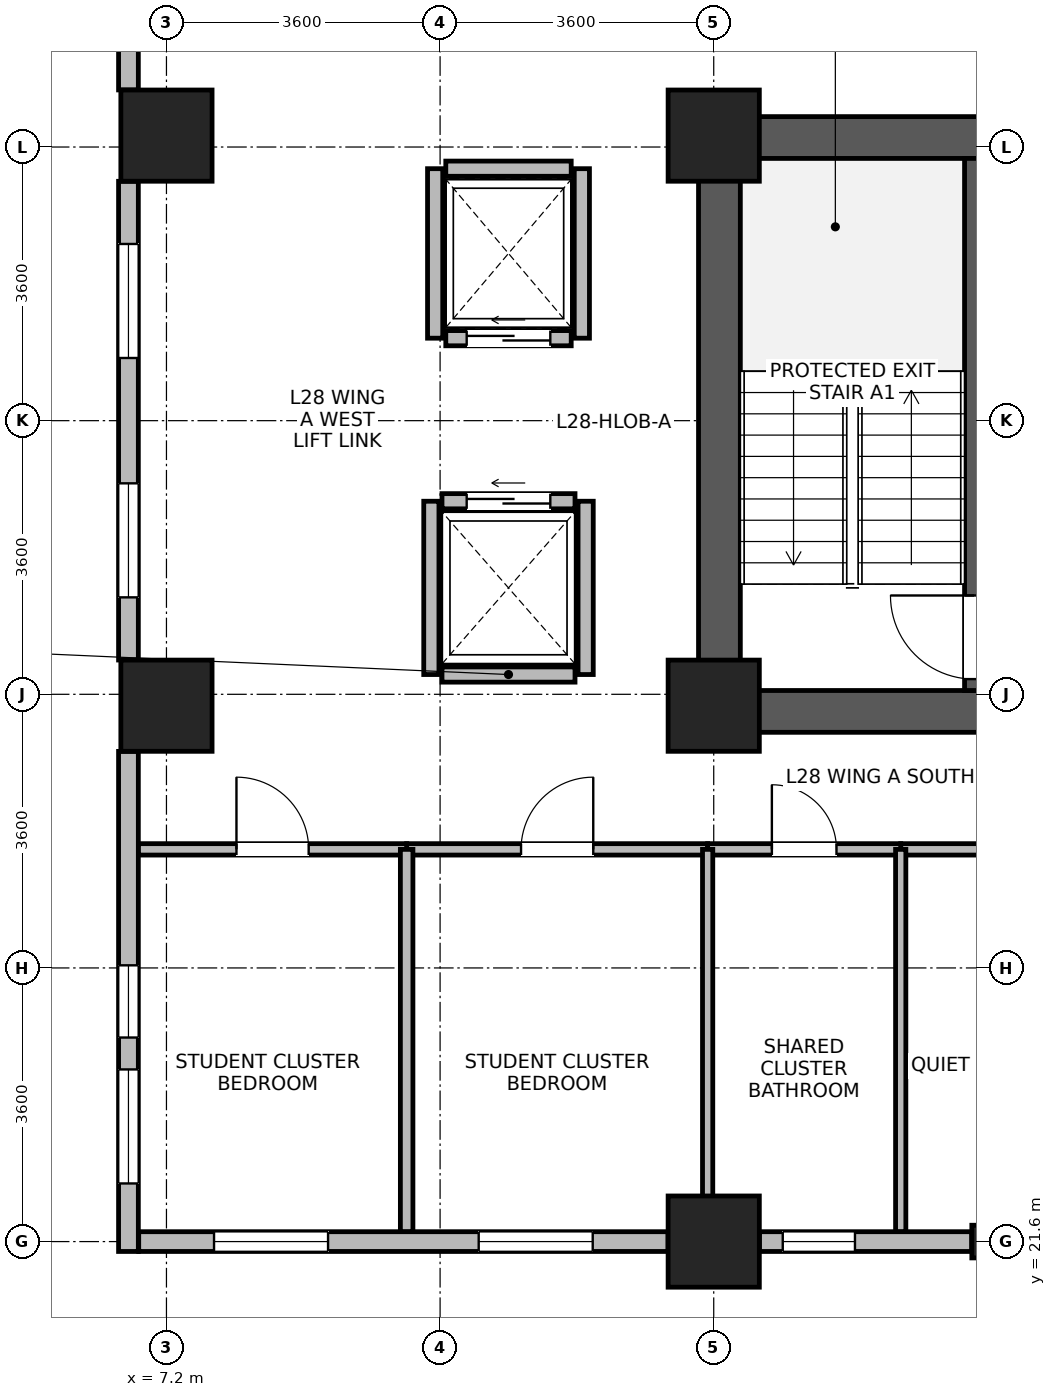
"""IFC4 building model, lengths in metres.
Left out: names, types, materials, properties, quantities, classifications, styles, units other than length and angle.
Written with IfcOpenShell. Run it as: python <this file> out.ifc"""

import sys

from ifc_helpers import new_model, si_unit, direction, frame, frame_2d, origin, origin_2d, place, context, subcontext, project, spatial, rectangle, i_section, extrude, source, transform, mapped, element, fill, save


model = new_model("IFC4")
c1 = context("Model", 3, precision=1e-05, world=origin(), true_north=direction((0.0, 1.0)))
c2 = subcontext(c1, "Body", "Model", "MODEL_VIEW")
j1 = project(units=[si_unit("LENGTHUNIT", "METRE"), si_unit("PLANEANGLEUNIT", "RADIAN")], contexts=[c1])
p1 = place(None, origin())
s1 = spatial("IfcSite", under=j1, at=p1, CompositionType="ELEMENT")
p2 = place(p1, origin())
s2 = spatial("IfcBuilding", under=s1, at=p2, CompositionType="ELEMENT")
p3 = place(p2, frame((0.0, 0.0, 111.9)))
s3 = spatial("IfcBuildingStorey", under=s2, at=p3, CompositionType="ELEMENT", Elevation=111.9)
p4 = place(p3, frame((14.475, 28.3, 0.0), z_axis=(0.0, 0.0, 1.0), x_axis=(0.0, 1.0, 0.0)))
e1 = element("IfcWall", 1, at=p4, inside=s3, PredefinedType="SHEAR", context=c2, shape_type="SweptSolid", body=[
    extrude(rectangle(XDim=8.1, YDim=0.55, at=frame_2d((4.05, 0.0))), origin(), (0.0, 0.0, 1.0), 3.45),
])
for number, where, z_axis, x_axis in (
    (2, (14.75, 28.575, 0.0), (0.0, 0.0, 1.0), (1.0, 0.0, 0.0)),
    (3, (14.75, 36.125, 0.0), (0.0, 0.0, 1.0), (1.0, 0.0, 0.0)),
):
    element("IfcWall", number, at=place(p3, frame(where, z_axis=z_axis, x_axis=x_axis)), inside=s3, PredefinedType="SHEAR", context=c2, shape_type="SweptSolid", body=[
        extrude(rectangle(XDim=3.2, YDim=0.55, at=frame_2d((1.6, 0.0))), origin(), (0.0, 0.0, 1.0), 3.45),
    ])
p5 = place(p3, frame((17.825, 28.85, 0.0), z_axis=(0.0, 0.0, 1.0), x_axis=(0.0, 1.0, 0.0)))
e4 = element("IfcWall", 4, at=p5, inside=s3, PredefinedType="SHEAR", context=c2, shape_type="SweptSolid", body=[
    extrude(rectangle(XDim=7.0, YDim=0.25, at=frame_2d((3.5, 0.0))), origin(), (0.0, 0.0, 1.0), 3.45),
])
p6 = place(p5, frame((0.15, 0.0, 0.0)))
e5 = element("IfcOpeningElement", 5, at=p6, cuts=e4, PredefinedType="OPENING", context=c2, shape_type="SweptSolid", body=[
    extrude(rectangle(XDim=1.1, YDim=2.08, at=frame_2d((0.55, 1.04))), frame((0.0, 0.135, 0.0), z_axis=(0.0, -1.0, 0.0), x_axis=(1.0, 0.0, 0.0)), (0.0, 0.0, 1.0), 0.27),
])
m1 = source(origin(), c2, "Body", "SweptSolid", [
    extrude(rectangle(XDim=1.2, YDim=1.2, at=origin_2d()), origin(), (0.0, 0.0, 1.0), 3.7),
])
for number, where, z_axis, x_axis in (
    (6, (7.2, 28.65, 0.0), (0.0, 0.0, 1.0), (1.0, 0.0, 0.0)),
    (7, (7.2, 36.15, 0.0), (0.0, 0.0, 1.0), (1.0, 0.0, 0.0)),
    (8, (14.4, 21.6, 0.0), (0.0, 0.0, 1.0), (1.0, 0.0, 0.0)),
    (9, (14.4, 28.65, 0.0), (0.0, 0.0, 1.0), (1.0, 0.0, 0.0)),
    (10, (14.4, 36.15, 0.0), (0.0, 0.0, 1.0), (1.0, 0.0, 0.0)),
):
    element("IfcColumn", number, at=place(p3, frame(where, z_axis=z_axis, x_axis=x_axis)), inside=s3, PredefinedType="COLUMN", context=c2, shape_type="MappedRepresentation", body=[
        mapped(m1, transform((0.0, 0.0, 0.0), x_axis=(1.0, 0.0, 0.0), y_axis=(0.0, 1.0, 0.0), z_axis=(0.0, 0.0, 1.0), scale=1.0)),
    ])
m2 = source(origin(), c2, "Body", "SweptSolid", [
    extrude(i_section(OverallWidth=0.409, OverallDepth=0.43, WebThickness=0.024, FlangeThickness=0.033, FilletRadius=0.015, at=origin_2d()), origin(), (0.0, 0.0, 1.0), 3.7),
])
p7 = place(p3, frame((18.0, 21.6, 0.0), z_axis=(0.0, 0.0, 1.0), x_axis=(1.0, 0.0, 0.0)))
e11 = element("IfcColumn", 11, at=p7, inside=s3, PredefinedType="COLUMN", context=c2, shape_type="MappedRepresentation", body=[
    mapped(m2, transform((0.0, 0.0, 0.0), x_axis=(1.0, 0.0, 0.0), y_axis=(0.0, 1.0, 0.0), z_axis=(0.0, 0.0, 1.0), scale=1.0)),
])
p8 = place(p3, frame((6.7, 36.751, 0.0), z_axis=(0.0, 0.0, 1.0), x_axis=(0.0, 1.0, 0.0)))
e12 = element("IfcWall", 12, at=p8, inside=s3, PredefinedType="STANDARD", context=c2, shape_type="SweptSolid", body=[
    extrude(rectangle(XDim=2.979, YDim=0.26, at=frame_2d((1.49, 0.0))), origin(), (0.0, 0.0, 1.0), 3.43),
])
p9 = place(p8, frame((1.014, 0.0, 0.85)))
e13 = element("IfcOpeningElement", 13, at=p9, cuts=e12, PredefinedType="OPENING", context=c2, shape_type="SweptSolid", body=[
    extrude(rectangle(XDim=0.95, YDim=1.75, at=frame_2d((0.475, 0.875))), frame((0.0, 0.14, 0.0), z_axis=(0.0, -1.0, 0.0), x_axis=(1.0, 0.0, 0.0)), (0.0, 0.0, 1.0), 0.28),
])
p10 = place(p3, frame((6.7, 29.251, 0.0), z_axis=(0.0, 0.0, 1.0), x_axis=(0.0, 1.0, 0.0)))
e14 = element("IfcWall", 14, at=p10, inside=s3, PredefinedType="STANDARD", context=c2, shape_type="SweptSolid", body=[
    extrude(rectangle(XDim=6.298, YDim=0.26, at=frame_2d((3.149, 0.0))), origin(), (0.0, 0.0, 1.0), 3.43),
])
p11 = place(p10, frame((0.824, 0.0, 0.85)))
e15 = element("IfcOpeningElement", 15, at=p11, cuts=e14, PredefinedType="OPENING", context=c2, shape_type="SweptSolid", body=[
    extrude(rectangle(XDim=1.5, YDim=1.85, at=frame_2d((0.75, 0.925))), frame((0.0, 0.14, 0.0), z_axis=(0.0, -1.0, 0.0), x_axis=(1.0, 0.0, 0.0)), (0.0, 0.0, 1.0), 0.28),
])
p12 = place(p10, frame((3.973, 0.0, 0.85)))
e16 = element("IfcOpeningElement", 16, at=p12, cuts=e14, PredefinedType="OPENING", context=c2, shape_type="SweptSolid", body=[
    extrude(rectangle(XDim=1.5, YDim=1.85, at=frame_2d((0.75, 0.925))), frame((0.0, 0.14, 0.0), z_axis=(0.0, -1.0, 0.0), x_axis=(1.0, 0.0, 0.0)), (0.0, 0.0, 1.0), 0.28),
])
p13 = place(p3, frame((6.7, 21.47, 0.0), z_axis=(0.0, 0.0, 1.0), x_axis=(0.0, 1.0, 0.0)))
e17 = element("IfcWall", 17, at=p13, inside=s3, PredefinedType="STANDARD", context=c2, shape_type="SweptSolid", body=[
    extrude(rectangle(XDim=6.579, YDim=0.26, at=frame_2d((3.29, 0.0))), origin(), (0.0, 0.0, 1.0), 3.43),
])
p14 = place(p13, frame((0.895, 0.0, 0.85)))
e18 = element("IfcOpeningElement", 18, at=p14, cuts=e17, PredefinedType="OPENING", context=c2, shape_type="SweptSolid", body=[
    extrude(rectangle(XDim=1.5, YDim=1.85, at=frame_2d((0.75, 0.925))), frame((0.0, 0.14, 0.0), z_axis=(0.0, -1.0, 0.0), x_axis=(1.0, 0.0, 0.0)), (0.0, 0.0, 1.0), 0.28),
])
p15 = place(p13, frame((2.814, 0.0, 0.85)))
e19 = element("IfcOpeningElement", 19, at=p15, cuts=e17, PredefinedType="OPENING", context=c2, shape_type="SweptSolid", body=[
    extrude(rectangle(XDim=0.95, YDim=1.75, at=frame_2d((0.475, 0.875))), frame((0.0, 0.14, 0.0), z_axis=(0.0, -1.0, 0.0), x_axis=(1.0, 0.0, 0.0)), (0.0, 0.0, 1.0), 0.28),
])
p16 = place(p3, frame((13.799, 21.6, 0.0), z_axis=(0.0, 0.0, 1.0), x_axis=(-1.0, 0.0, 0.0)))
e20 = element("IfcWall", 20, at=p16, inside=s3, PredefinedType="STANDARD", context=c2, shape_type="SweptSolid", body=[
    extrude(rectangle(XDim=6.964, YDim=0.26, at=frame_2d((3.482, 0.0))), origin(), (0.0, 0.0, 1.0), 3.43),
])
p17 = place(p16, frame((0.991, 0.0, 0.85)))
e21 = element("IfcOpeningElement", 21, at=p17, cuts=e20, PredefinedType="OPENING", context=c2, shape_type="SweptSolid", body=[
    extrude(rectangle(XDim=1.5, YDim=1.85, at=frame_2d((0.75, 0.925))), frame((0.0, 0.14, 0.0), z_axis=(0.0, -1.0, 0.0), x_axis=(1.0, 0.0, 0.0)), (0.0, 0.0, 1.0), 0.28),
])
p18 = place(p16, frame((4.473, 0.0, 0.85)))
e22 = element("IfcOpeningElement", 22, at=p18, cuts=e20, PredefinedType="OPENING", context=c2, shape_type="SweptSolid", body=[
    extrude(rectangle(XDim=1.5, YDim=1.85, at=frame_2d((0.75, 0.925))), frame((0.0, 0.14, 0.0), z_axis=(0.0, -1.0, 0.0), x_axis=(1.0, 0.0, 0.0)), (0.0, 0.0, 1.0), 0.28),
])
p19 = place(p3, frame((17.794, 21.6, 0.0), z_axis=(0.0, 0.0, 1.0), x_axis=(-1.0, 0.0, 0.0)))
e23 = element("IfcWall", 23, at=p19, inside=s3, PredefinedType="STANDARD", context=c2, shape_type="SweptSolid", body=[
    extrude(rectangle(XDim=2.793, YDim=0.26, at=frame_2d((1.397, 0.0))), origin(), (0.0, 0.0, 1.0), 2.98),
])
p20 = place(p19, frame((1.536, 0.0, 0.85)))
e24 = element("IfcOpeningElement", 24, at=p20, cuts=e23, PredefinedType="OPENING", context=c2, shape_type="SweptSolid", body=[
    extrude(rectangle(XDim=0.95, YDim=1.75, at=frame_2d((0.475, 0.875))), frame((0.0, 0.14, 0.0), z_axis=(0.0, -1.0, 0.0), x_axis=(1.0, 0.0, 0.0)), (0.0, 0.0, 1.0), 0.28),
])
p21 = place(p3, frame((10.825, 29.06, 0.0), z_axis=(0.0, 0.0, 1.0), x_axis=(1.0, 0.0, 0.0)))
e25 = element("IfcWall", 25, at=p21, inside=s3, PredefinedType="PARTITIONING", context=c2, shape_type="SweptSolid", body=[
    extrude(rectangle(XDim=1.75, YDim=0.2, at=frame_2d((0.875, 0.0))), origin(), (0.0, 0.0, 1.0), 3.43),
])
p22 = place(p3, frame((10.825, 31.34, 0.0), z_axis=(0.0, 0.0, 1.0), x_axis=(1.0, 0.0, 0.0)))
e26 = element("IfcWall", 26, at=p22, inside=s3, PredefinedType="PARTITIONING", context=c2, shape_type="SweptSolid", body=[
    extrude(rectangle(XDim=1.75, YDim=0.2, at=frame_2d((0.875, 0.0))), origin(), (0.0, 0.0, 1.0), 3.43),
])
p23 = place(p22, frame((0.325, 0.0, 0.0)))
e27 = element("IfcOpeningElement", 27, at=p23, cuts=e26, PredefinedType="OPENING", context=c2, shape_type="SweptSolid", body=[
    extrude(rectangle(XDim=1.1, YDim=2.12, at=frame_2d((0.55, 1.06))), frame((0.0, 0.11, 0.0), z_axis=(0.0, -1.0, 0.0), x_axis=(1.0, 0.0, 0.0)), (0.0, 0.0, 1.0), 0.22),
])
for number, where, z_axis, x_axis in (
    (28, (10.685, 29.06, 0.0), (0.0, 0.0, 1.0), (0.0, 1.0, 0.0)),
    (29, (12.715, 29.06, 0.0), (0.0, 0.0, 1.0), (0.0, 1.0, 0.0)),
):
    element("IfcWall", number, at=place(p3, frame(where, z_axis=z_axis, x_axis=x_axis)), inside=s3, PredefinedType="PARTITIONING", context=c2, shape_type="SweptSolid", body=[
        extrude(rectangle(XDim=2.28, YDim=0.2, at=frame_2d((1.14, 0.0))), origin(), (0.0, 0.0, 1.0), 3.43),
    ])
p24 = place(p3, frame((10.875, 33.485, 0.0), z_axis=(0.0, 0.0, 1.0), x_axis=(1.0, 0.0, 0.0)))
e30 = element("IfcWall", 30, at=p24, inside=s3, PredefinedType="PARTITIONING", context=c2, shape_type="SweptSolid", body=[
    extrude(rectangle(XDim=1.65, YDim=0.2, at=frame_2d((0.825, 0.0))), origin(), (0.0, 0.0, 1.0), 3.43),
])
p25 = place(p24, frame((0.275, 0.0, 0.0)))
e31 = element("IfcOpeningElement", 31, at=p25, cuts=e30, PredefinedType="OPENING", context=c2, shape_type="SweptSolid", body=[
    extrude(rectangle(XDim=1.1, YDim=2.12, at=frame_2d((0.55, 1.06))), frame((0.0, 0.11, 0.0), z_axis=(0.0, -1.0, 0.0), x_axis=(1.0, 0.0, 0.0)), (0.0, 0.0, 1.0), 0.22),
])
p26 = place(p3, frame((10.875, 35.715, 0.0), z_axis=(0.0, 0.0, 1.0), x_axis=(1.0, 0.0, 0.0)))
e32 = element("IfcWall", 32, at=p26, inside=s3, PredefinedType="PARTITIONING", context=c2, shape_type="SweptSolid", body=[
    extrude(rectangle(XDim=1.65, YDim=0.2, at=frame_2d((0.825, 0.0))), origin(), (0.0, 0.0, 1.0), 3.43),
])
for number, where, z_axis, x_axis in (
    (33, (10.735, 33.485, 0.0), (0.0, 0.0, 1.0), (0.0, 1.0, 0.0)),
    (34, (12.665, 33.485, 0.0), (0.0, 0.0, 1.0), (0.0, 1.0, 0.0)),
):
    element("IfcWall", number, at=place(p3, frame(where, z_axis=z_axis, x_axis=x_axis)), inside=s3, PredefinedType="PARTITIONING", context=c2, shape_type="SweptSolid", body=[
        extrude(rectangle(XDim=2.23, YDim=0.2, at=frame_2d((1.115, 0.0))), origin(), (0.0, 0.0, 1.0), 3.43),
    ])
p27 = place(p3, frame((16.86, 26.76, 0.0), z_axis=(0.0, 0.0, 1.0), x_axis=(1.0, 0.0, 0.0)))
e35 = element("IfcWall", 35, at=p27, inside=s3, PredefinedType="PARTITIONING", context=c2, shape_type="SweptSolid", body=[
    extrude(rectangle(XDim=7.18, YDim=0.15, at=frame_2d((3.59, 0.0))), origin(), (0.0, 0.0, 1.0), 3.43),
])
p28 = place(p27, frame((2.94, 0.0, 0.0)))
e36 = element("IfcOpeningElement", 36, at=p28, cuts=e35, PredefinedType="OPENING", context=c2, shape_type="SweptSolid", body=[
    extrude(rectangle(XDim=1.3, YDim=2.12, at=frame_2d((0.65, 1.06))), frame((0.0, 0.085, 0.0), z_axis=(0.0, -1.0, 0.0), x_axis=(1.0, 0.0, 0.0)), (0.0, 0.0, 1.0), 0.17),
])
p29 = place(p3, frame((10.36, 26.76, 0.0), z_axis=(0.0, 0.0, 1.0), x_axis=(1.0, 0.0, 0.0)))
e37 = element("IfcWall", 37, at=p29, inside=s3, PredefinedType="PARTITIONING", context=c2, shape_type="SweptSolid", body=[
    extrude(rectangle(XDim=3.96, YDim=0.15, at=frame_2d((1.98, 0.0))), origin(), (0.0, 0.0, 1.0), 3.43),
])
p30 = place(p29, frame((1.505, 0.0, 0.0)))
e38 = element("IfcOpeningElement", 38, at=p30, cuts=e37, PredefinedType="OPENING", context=c2, shape_type="SweptSolid", body=[
    extrude(rectangle(XDim=0.95, YDim=2.1, at=frame_2d((0.475, 1.05))), frame((0.0, 0.085, 0.0), z_axis=(0.0, -1.0, 0.0), x_axis=(1.0, 0.0, 0.0)), (0.0, 0.0, 1.0), 0.17),
])
p31 = place(p3, frame((6.832, 26.76, 0.0), z_axis=(0.0, 0.0, 1.0), x_axis=(1.0, 0.0, 0.0)))
e39 = element("IfcWall", 39, at=p31, inside=s3, PredefinedType="PARTITIONING", context=c2, shape_type="SweptSolid", body=[
    extrude(rectangle(XDim=3.528, YDim=0.15, at=frame_2d((1.764, 0.0))), origin(), (0.0, 0.0, 1.0), 3.43),
])
p32 = place(p31, frame((1.289, 0.0, 0.0)))
e40 = element("IfcOpeningElement", 40, at=p32, cuts=e39, PredefinedType="OPENING", context=c2, shape_type="SweptSolid", body=[
    extrude(rectangle(XDim=0.95, YDim=2.1, at=frame_2d((0.475, 1.05))), frame((0.0, 0.085, 0.0), z_axis=(0.0, -1.0, 0.0), x_axis=(1.0, 0.0, 0.0)), (0.0, 0.0, 1.0), 0.17),
])
p33 = place(p3, frame((14.32, 26.76, 0.0), z_axis=(0.0, 0.0, 1.0), x_axis=(1.0, 0.0, 0.0)))
e41 = element("IfcWall", 41, at=p33, inside=s3, PredefinedType="PARTITIONING", context=c2, shape_type="SweptSolid", body=[
    extrude(rectangle(XDim=2.54, YDim=0.15, at=frame_2d((1.27, 0.0))), origin(), (0.0, 0.0, 1.0), 3.43),
])
p34 = place(p33, frame((0.845, 0.0, 0.0)))
e42 = element("IfcOpeningElement", 42, at=p34, cuts=e41, PredefinedType="OPENING", context=c2, shape_type="SweptSolid", body=[
    extrude(rectangle(XDim=0.85, YDim=2.04, at=frame_2d((0.425, 1.02))), frame((0.0, 0.085, 0.0), z_axis=(0.0, -1.0, 0.0), x_axis=(1.0, 0.0, 0.0)), (0.0, 0.0, 1.0), 0.17),
])
p35 = place(p3, frame((10.36, 21.732, 0.0), z_axis=(0.0, 0.0, 1.0), x_axis=(0.0, 1.0, 0.0)))
e43 = element("IfcWall", 43, at=p35, inside=s3, PredefinedType="PARTITIONING", context=c2, shape_type="SweptSolid", body=[
    extrude(rectangle(XDim=5.028, YDim=0.165, at=frame_2d((2.514, 0.0))), origin(), (0.0, 0.0, 1.0), 3.43),
])
p36 = place(p3, frame((14.32, 21.732, 0.0), z_axis=(0.0, 0.0, 1.0), x_axis=(0.0, 1.0, 0.0)))
e44 = element("IfcWall", 44, at=p36, inside=s3, PredefinedType="PARTITIONING", context=c2, shape_type="SweptSolid", body=[
    extrude(rectangle(XDim=5.028, YDim=0.135, at=frame_2d((2.514, 0.0))), origin(), (0.0, 0.0, 1.0), 2.93),
])
p37 = place(p3, frame((16.86, 21.732, 0.0), z_axis=(0.0, 0.0, 1.0), x_axis=(0.0, 1.0, 0.0)))
e45 = element("IfcWall", 45, at=p37, inside=s3, PredefinedType="PARTITIONING", context=c2, shape_type="SweptSolid", body=[
    extrude(rectangle(XDim=5.028, YDim=0.135, at=frame_2d((2.514, 0.0))), origin(), (0.0, 0.0, 1.0), 3.43),
])
p38 = place(p11, origin())
e46 = element("IfcWindow", 46, at=p38, inside=s3, PartitioningType="SINGLE_PANEL", PredefinedType="WINDOW", context=c2, shape_type="SweptSolid", body=[
    extrude(rectangle(XDim=1.5, YDim=1.85, at=frame_2d((0.75, 0.925))), frame((0.0, 0.03, 0.0), z_axis=(0.0, -1.0, 0.0), x_axis=(1.0, 0.0, 0.0)), (0.0, 0.0, 1.0), 0.06),
])
fill(e15, e46)
p39 = place(p12, origin())
e47 = element("IfcWindow", 47, at=p39, inside=s3, PartitioningType="SINGLE_PANEL", PredefinedType="WINDOW", context=c2, shape_type="SweptSolid", body=[
    extrude(rectangle(XDim=1.5, YDim=1.85, at=frame_2d((0.75, 0.925))), frame((0.0, 0.03, 0.0), z_axis=(0.0, -1.0, 0.0), x_axis=(1.0, 0.0, 0.0)), (0.0, 0.0, 1.0), 0.06),
])
fill(e16, e47)
p40 = place(p14, origin())
e48 = element("IfcWindow", 48, at=p40, inside=s3, PartitioningType="SINGLE_PANEL", PredefinedType="WINDOW", context=c2, shape_type="SweptSolid", body=[
    extrude(rectangle(XDim=1.5, YDim=1.85, at=frame_2d((0.75, 0.925))), frame((0.0, 0.03, 0.0), z_axis=(0.0, -1.0, 0.0), x_axis=(1.0, 0.0, 0.0)), (0.0, 0.0, 1.0), 0.06),
])
fill(e18, e48)
p41 = place(p15, origin())
e49 = element("IfcWindow", 49, at=p41, inside=s3, PartitioningType="SINGLE_PANEL", PredefinedType="WINDOW", context=c2, shape_type="SweptSolid", body=[
    extrude(rectangle(XDim=0.95, YDim=1.75, at=frame_2d((0.475, 0.875))), frame((0.0, 0.03, 0.0), z_axis=(0.0, -1.0, 0.0), x_axis=(1.0, 0.0, 0.0)), (0.0, 0.0, 1.0), 0.06),
])
fill(e19, e49)
p42 = place(p17, origin())
e50 = element("IfcWindow", 50, at=p42, inside=s3, PartitioningType="SINGLE_PANEL", PredefinedType="WINDOW", context=c2, shape_type="SweptSolid", body=[
    extrude(rectangle(XDim=1.5, YDim=1.85, at=frame_2d((0.75, 0.925))), frame((0.0, 0.03, 0.0), z_axis=(0.0, -1.0, 0.0), x_axis=(1.0, 0.0, 0.0)), (0.0, 0.0, 1.0), 0.06),
])
fill(e21, e50)
p43 = place(p18, origin())
e51 = element("IfcWindow", 51, at=p43, inside=s3, PartitioningType="SINGLE_PANEL", PredefinedType="WINDOW", context=c2, shape_type="SweptSolid", body=[
    extrude(rectangle(XDim=1.5, YDim=1.85, at=frame_2d((0.75, 0.925))), frame((0.0, 0.03, 0.0), z_axis=(0.0, -1.0, 0.0), x_axis=(1.0, 0.0, 0.0)), (0.0, 0.0, 1.0), 0.06),
])
fill(e22, e51)
p44 = place(p20, origin())
e52 = element("IfcWindow", 52, at=p44, inside=s3, PartitioningType="SINGLE_PANEL", PredefinedType="WINDOW", context=c2, shape_type="SweptSolid", body=[
    extrude(rectangle(XDim=0.95, YDim=1.75, at=frame_2d((0.475, 0.875))), frame((0.0, 0.03, 0.0), z_axis=(0.0, -1.0, 0.0), x_axis=(1.0, 0.0, 0.0)), (0.0, 0.0, 1.0), 0.06),
])
fill(e24, e52)
p45 = place(p6, origin())
e53 = element("IfcDoor", 53, at=p45, inside=s3, OperationType="SINGLE_SWING_RIGHT", PredefinedType="DOOR", context=c2, shape_type="SweptSolid", body=[
    extrude(rectangle(XDim=1.1, YDim=2.08, at=frame_2d((0.55, 1.04))), frame((0.0, 0.025, 0.0), z_axis=(0.0, -1.0, 0.0), x_axis=(1.0, 0.0, 0.0)), (0.0, 0.0, 1.0), 0.05),
])
fill(e5, e53)
p46 = place(p23, origin())
e54 = element("IfcDoor", 54, at=p46, inside=s3, OperationType="SLIDING_TO_LEFT", PredefinedType="DOOR", context=c2, shape_type="SweptSolid", body=[
    extrude(rectangle(XDim=1.1, YDim=2.12, at=frame_2d((0.55, 1.06))), frame((0.0, 0.025, 0.0), z_axis=(0.0, -1.0, 0.0), x_axis=(1.0, 0.0, 0.0)), (0.0, 0.0, 1.0), 0.05),
])
fill(e27, e54)
p47 = place(p25, origin())
e55 = element("IfcDoor", 55, at=p47, inside=s3, OperationType="SLIDING_TO_LEFT", PredefinedType="DOOR", context=c2, shape_type="SweptSolid", body=[
    extrude(rectangle(XDim=1.1, YDim=2.12, at=frame_2d((0.55, 1.06))), frame((0.0, 0.025, 0.0), z_axis=(0.0, -1.0, 0.0), x_axis=(1.0, 0.0, 0.0)), (0.0, 0.0, 1.0), 0.05),
])
fill(e31, e55)
p48 = place(p30, origin())
e56 = element("IfcDoor", 56, at=p48, inside=s3, OperationType="SINGLE_SWING_RIGHT", PredefinedType="DOOR", context=c2, shape_type="SweptSolid", body=[
    extrude(rectangle(XDim=0.95, YDim=2.1, at=frame_2d((0.475, 1.05))), frame((0.0, 0.025, 0.0), z_axis=(0.0, -1.0, 0.0), x_axis=(1.0, 0.0, 0.0)), (0.0, 0.0, 1.0), 0.05),
])
fill(e38, e56)
p49 = place(p32, origin())
e57 = element("IfcDoor", 57, at=p49, inside=s3, OperationType="SINGLE_SWING_LEFT", PredefinedType="DOOR", context=c2, shape_type="SweptSolid", body=[
    extrude(rectangle(XDim=0.95, YDim=2.1, at=frame_2d((0.475, 1.05))), frame((0.0, 0.025, 0.0), z_axis=(0.0, -1.0, 0.0), x_axis=(1.0, 0.0, 0.0)), (0.0, 0.0, 1.0), 0.05),
])
fill(e40, e57)
p50 = place(p34, origin())
e58 = element("IfcDoor", 58, at=p50, inside=s3, OperationType="SINGLE_SWING_LEFT", PredefinedType="DOOR", context=c2, shape_type="SweptSolid", body=[
    extrude(rectangle(XDim=0.85, YDim=2.04, at=frame_2d((0.425, 1.02))), frame((0.0, 0.025, 0.0), z_axis=(0.0, -1.0, 0.0), x_axis=(1.0, 0.0, 0.0)), (0.0, 0.0, 1.0), 0.05),
])
fill(e42, e58)
save(model, sys.argv[1])
